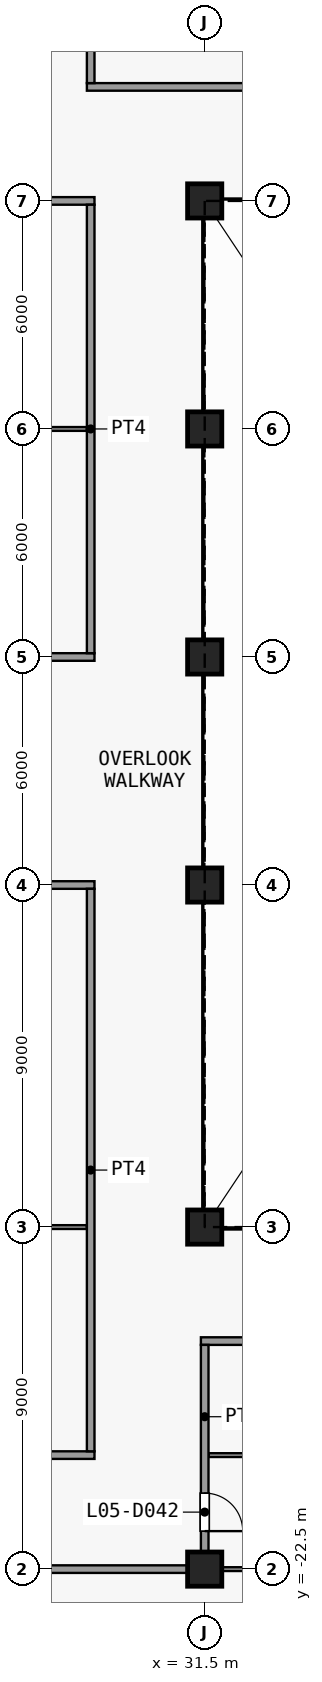
"""IFC4 building model, lengths in metres.
Left out: names, types, materials, properties, quantities, classifications, styles, units other than length and angle.
Written with IfcOpenShell. Run it as: python <this file> out.ifc"""

import sys

from ifc_helpers import new_model, si_unit, direction, frame, frame_2d, origin, origin_2d, place, context, subcontext, project, spatial, rectangle, extrude, element, fill, save


model = new_model("IFC4")
c1 = context("Model", 3, precision=1e-05, world=origin(), true_north=direction((0.0, 1.0)))
c2 = subcontext(c1, "Body", "Model", "MODEL_VIEW")
j1 = project(units=[si_unit("LENGTHUNIT", "METRE"), si_unit("PLANEANGLEUNIT", "RADIAN")], contexts=[c1])
p1 = place(None, origin())
s1 = spatial("IfcSite", under=j1, at=p1, CompositionType="ELEMENT")
p2 = place(p1, origin())
s2 = spatial("IfcBuilding", under=s1, at=p2, CompositionType="ELEMENT")
p3 = place(p2, frame((0.0, 0.0, 28.0)))
s3 = spatial("IfcBuildingStorey", under=s2, at=p3, CompositionType="ELEMENT", Elevation=28.0)
for number, where, z_axis, x_axis in (
    (1, (31.5, -22.5, 0.0), (0.0, 0.0, 1.0), (1.0, 0.0, 0.0)),
    (2, (31.5, -13.5, 0.0), (0.0, 0.0, 1.0), (1.0, 0.0, 0.0)),
    (3, (31.5, -4.5, 0.0), (0.0, 0.0, 1.0), (1.0, 0.0, 0.0)),
    (4, (31.5, 1.5, 0.0), (0.0, 0.0, 1.0), (1.0, 0.0, 0.0)),
    (5, (31.5, 7.5, 0.0), (0.0, 0.0, 1.0), (1.0, 0.0, 0.0)),
    (6, (31.5, 13.5, 0.0), (0.0, 0.0, 1.0), (1.0, 0.0, 0.0)),
):
    element("IfcColumn", number, at=place(p3, frame(where, z_axis=z_axis, x_axis=x_axis)), inside=s3, PredefinedType="COLUMN", context=c2, shape_type="SweptSolid", body=[
        extrude(rectangle(XDim=0.9, YDim=0.9, at=origin_2d()), origin(), (0.0, 0.0, 1.0), 4.5),
    ])
p4 = place(p3, frame((17.4, -22.5, 0.0), z_axis=(0.0, 0.0, 1.0), x_axis=(1.0, 0.0, 0.0)))
e7 = element("IfcWall", 7, at=p4, inside=s3, PredefinedType="PARTITIONING", context=c2, shape_type="SweptSolid", body=[
    extrude(rectangle(XDim=14.1, YDim=0.2, at=frame_2d((7.05, 0.0))), origin(), (0.0, 0.0, 1.0), 4.1),
])
p5 = place(p3, frame((31.5, -22.5, 0.0), z_axis=(0.0, 0.0, 1.0), x_axis=(1.0, 0.0, 0.0)))
e8 = element("IfcWall", 8, at=p5, inside=s3, PredefinedType="PARTITIONING", context=c2, shape_type="SweptSolid", body=[
    extrude(rectangle(XDim=20.95, YDim=0.1, at=frame_2d((10.475, 0.0))), origin(), (0.0, 0.0, 1.0), 4.1),
])
p6 = place(p3, frame((13.5, -19.5, 0.0), z_axis=(0.0, 0.0, 1.0), x_axis=(1.0, 0.0, 0.0)))
e9 = element("IfcWall", 9, at=p6, inside=s3, PredefinedType="PARTITIONING", context=c2, shape_type="SweptSolid", body=[
    extrude(rectangle(XDim=15.1, YDim=0.2, at=frame_2d((7.55, 0.0))), origin(), (0.0, 0.0, 1.0), 4.1),
])
p7 = place(p6, frame((7.0, 0.0, 0.0)))
e10 = element("IfcOpeningElement", 10, at=p7, cuts=e9, PredefinedType="OPENING", context=c2, shape_type="SweptSolid", body=[
    extrude(rectangle(XDim=1.0, YDim=2.1, at=frame_2d((0.5, 1.05))), frame((0.0, 0.11, 0.0), z_axis=(0.0, -1.0, 0.0), x_axis=(1.0, 0.0, 0.0)), (0.0, 0.0, 1.0), 0.22),
])
p8 = place(p3, frame((31.6, -19.5, 0.0), z_axis=(0.0, 0.0, 1.0), x_axis=(1.0, 0.0, 0.0)))
e11 = element("IfcWall", 11, at=p8, inside=s3, PredefinedType="PARTITIONING", context=c2, shape_type="SweptSolid", body=[
    extrude(rectangle(XDim=20.85, YDim=0.1, at=frame_2d((10.425, 0.0))), origin(), (0.0, 0.0, 1.0), 4.1),
])
p9 = place(p3, frame((31.4, -16.5, 0.0), z_axis=(0.0, 0.0, 1.0), x_axis=(1.0, 0.0, 0.0)))
e12 = element("IfcWall", 12, at=p9, inside=s3, PredefinedType="PARTITIONING", context=c2, shape_type="SweptSolid", body=[
    extrude(rectangle(XDim=21.0, YDim=0.2, at=frame_2d((10.5, 0.0))), origin(), (0.0, 0.0, 1.0), 4.1),
])
p10 = place(p9, frame((3.2, 0.0, 0.0)))
e13 = element("IfcOpeningElement", 13, at=p10, cuts=e12, PredefinedType="OPENING", context=c2, shape_type="SweptSolid", body=[
    extrude(rectangle(XDim=1.0, YDim=2.1, at=frame_2d((0.5, 1.05))), frame((0.0, 0.11, 0.0), z_axis=(0.0, -1.0, 0.0), x_axis=(1.0, 0.0, 0.0)), (0.0, 0.0, 1.0), 0.22),
])
p11 = place(p9, frame((14.0, 0.0, 0.0)))
e14 = element("IfcOpeningElement", 14, at=p11, cuts=e12, PredefinedType="OPENING", context=c2, shape_type="SweptSolid", body=[
    extrude(rectangle(XDim=1.0, YDim=2.1, at=frame_2d((0.5, 1.05))), frame((0.0, 0.11, 0.0), z_axis=(0.0, -1.0, 0.0), x_axis=(1.0, 0.0, 0.0)), (0.0, 0.0, 1.0), 0.22),
])
p12 = place(p3, frame((13.5, -13.5, 0.0), z_axis=(0.0, 0.0, 1.0), x_axis=(1.0, 0.0, 0.0)))
e15 = element("IfcWall", 15, at=p12, inside=s3, PredefinedType="PARTITIONING", context=c2, shape_type="SweptSolid", body=[
    extrude(rectangle(XDim=14.9, YDim=0.1, at=frame_2d((7.45, 0.0))), origin(), (0.0, 0.0, 1.0), 4.1),
])
p13 = place(p3, frame((13.4, -4.5, 0.0), z_axis=(0.0, 0.0, 1.0), x_axis=(1.0, 0.0, 0.0)))
e16 = element("IfcWall", 16, at=p13, inside=s3, PredefinedType="PARTITIONING", context=c2, shape_type="SweptSolid", body=[
    extrude(rectangle(XDim=15.2, YDim=0.2, at=frame_2d((7.6, 0.0))), origin(), (0.0, 0.0, 1.0), 4.1),
])
p14 = place(p13, frame((7.1, 0.0, 0.0)))
e17 = element("IfcOpeningElement", 17, at=p14, cuts=e16, PredefinedType="OPENING", context=c2, shape_type="SweptSolid", body=[
    extrude(rectangle(XDim=1.0, YDim=2.1, at=frame_2d((0.5, 1.05))), frame((0.0, 0.11, 0.0), z_axis=(0.0, -1.0, 0.0), x_axis=(1.0, 0.0, 0.0)), (0.0, 0.0, 1.0), 0.22),
])
p15 = place(p3, frame((20.3, 1.5, 0.0), z_axis=(0.0, 0.0, 1.0), x_axis=(1.0, 0.0, 0.0)))
e18 = element("IfcWall", 18, at=p15, inside=s3, PredefinedType="PARTITIONING", context=c2, shape_type="SweptSolid", body=[
    extrude(rectangle(XDim=8.3, YDim=0.2, at=frame_2d((4.15, 0.0))), origin(), (0.0, 0.0, 1.0), 4.1),
])
p16 = place(p15, frame((3.7, 0.0, 0.0)))
e19 = element("IfcOpeningElement", 19, at=p16, cuts=e18, PredefinedType="OPENING", context=c2, shape_type="SweptSolid", body=[
    extrude(rectangle(XDim=1.0, YDim=2.1, at=frame_2d((0.5, 1.05))), frame((0.0, 0.11, 0.0), z_axis=(0.0, -1.0, 0.0), x_axis=(1.0, 0.0, 0.0)), (0.0, 0.0, 1.0), 0.22),
])
p17 = place(p3, frame((20.5, 7.5, 0.0), z_axis=(0.0, 0.0, 1.0), x_axis=(1.0, 0.0, 0.0)))
e20 = element("IfcWall", 20, at=p17, inside=s3, PredefinedType="PARTITIONING", context=c2, shape_type="SweptSolid", body=[
    extrude(rectangle(XDim=7.9, YDim=0.1, at=frame_2d((3.95, 0.0))), origin(), (0.0, 0.0, 1.0), 4.1),
])
p18 = place(p3, frame((20.3, 13.5, 0.0), z_axis=(0.0, 0.0, 1.0), x_axis=(1.0, 0.0, 0.0)))
e21 = element("IfcWall", 21, at=p18, inside=s3, PredefinedType="PARTITIONING", context=c2, shape_type="SweptSolid", body=[
    extrude(rectangle(XDim=8.3, YDim=0.2, at=frame_2d((4.15, 0.0))), origin(), (0.0, 0.0, 1.0), 4.1),
])
p19 = place(p18, frame((3.7, 0.0, 0.0)))
e22 = element("IfcOpeningElement", 22, at=p19, cuts=e21, PredefinedType="OPENING", context=c2, shape_type="SweptSolid", body=[
    extrude(rectangle(XDim=1.0, YDim=2.1, at=frame_2d((0.5, 1.05))), frame((0.0, 0.11, 0.0), z_axis=(0.0, -1.0, 0.0), x_axis=(1.0, 0.0, 0.0)), (0.0, 0.0, 1.0), 0.22),
])
p20 = place(p3, frame((28.4, 16.5, 0.0), z_axis=(0.0, 0.0, 1.0), x_axis=(1.0, 0.0, 0.0)))
e23 = element("IfcWall", 23, at=p20, inside=s3, PredefinedType="PARTITIONING", context=c2, shape_type="SweptSolid", body=[
    extrude(rectangle(XDim=24.2, YDim=0.2, at=frame_2d((12.1, 0.0))), origin(), (0.0, 0.0, 1.0), 4.1),
])
p21 = place(p20, frame((6.2, 0.0, 0.0)))
e24 = element("IfcOpeningElement", 24, at=p21, cuts=e23, PredefinedType="OPENING", context=c2, shape_type="SweptSolid", body=[
    extrude(rectangle(XDim=1.0, YDim=2.1, at=frame_2d((0.5, 1.05))), frame((0.0, 0.11, 0.0), z_axis=(0.0, -1.0, 0.0), x_axis=(1.0, 0.0, 0.0)), (0.0, 0.0, 1.0), 0.22),
])
p22 = place(p20, frame((17.0, 0.0, 0.0)))
e25 = element("IfcOpeningElement", 25, at=p22, cuts=e23, PredefinedType="OPENING", context=c2, shape_type="SweptSolid", body=[
    extrude(rectangle(XDim=1.0, YDim=2.1, at=frame_2d((0.5, 1.05))), frame((0.0, 0.11, 0.0), z_axis=(0.0, -1.0, 0.0), x_axis=(1.0, 0.0, 0.0)), (0.0, 0.0, 1.0), 0.22),
])
p23 = place(p3, frame((28.5, -19.4, 0.0), z_axis=(0.0, 0.0, 1.0), x_axis=(0.0, 1.0, 0.0)))
e26 = element("IfcWall", 26, at=p23, inside=s3, PredefinedType="PARTITIONING", context=c2, shape_type="SweptSolid", body=[
    extrude(rectangle(XDim=14.8, YDim=0.2, at=frame_2d((7.4, 0.0))), origin(), (0.0, 0.0, 1.0), 4.1),
])
p24 = place(p3, frame((28.5, 1.6, 0.0), z_axis=(0.0, 0.0, 1.0), x_axis=(0.0, 1.0, 0.0)))
e27 = element("IfcWall", 27, at=p24, inside=s3, PredefinedType="PARTITIONING", context=c2, shape_type="SweptSolid", body=[
    extrude(rectangle(XDim=11.8, YDim=0.2, at=frame_2d((5.9, 0.0))), origin(), (0.0, 0.0, 1.0), 4.1),
])
p25 = place(p3, frame((28.5, 16.6, 0.0), z_axis=(0.0, 0.0, 1.0), x_axis=(0.0, 1.0, 0.0)))
e28 = element("IfcWall", 28, at=p25, inside=s3, PredefinedType="PARTITIONING", context=c2, shape_type="SweptSolid", body=[
    extrude(rectangle(XDim=2.8, YDim=0.2, at=frame_2d((1.4, 0.0))), origin(), (0.0, 0.0, 1.0), 4.1),
])
p26 = place(p3, frame((31.5, -22.4, 0.0), z_axis=(0.0, 0.0, 1.0), x_axis=(0.0, 1.0, 0.0)))
e29 = element("IfcWall", 29, at=p26, inside=s3, PredefinedType="PARTITIONING", context=c2, shape_type="SweptSolid", body=[
    extrude(rectangle(XDim=5.8, YDim=0.2, at=frame_2d((2.9, 0.0))), origin(), (0.0, 0.0, 1.0), 4.1),
])
p27 = place(p26, frame((0.9, 0.0, 0.0)))
e30 = element("IfcOpeningElement", 30, at=p27, cuts=e29, PredefinedType="OPENING", context=c2, shape_type="SweptSolid", body=[
    extrude(rectangle(XDim=1.0, YDim=2.1, at=frame_2d((0.5, 1.05))), frame((0.0, 0.11, 0.0), z_axis=(0.0, -1.0, 0.0), x_axis=(1.0, 0.0, 0.0)), (0.0, 0.0, 1.0), 0.22),
])
p28 = place(p27, origin())
e31 = element("IfcDoor", 31, at=p28, inside=s3, OperationType="SINGLE_SWING_LEFT", PredefinedType="DOOR", context=c2, shape_type="SweptSolid", body=[
    extrude(rectangle(XDim=1.0, YDim=2.1, at=frame_2d((0.5, 1.05))), frame((0.0, 0.025, 0.0), z_axis=(0.0, -1.0, 0.0), x_axis=(1.0, 0.0, 0.0)), (0.0, 0.0, 1.0), 0.05),
])
fill(e30, e31)
save(model, sys.argv[1])
